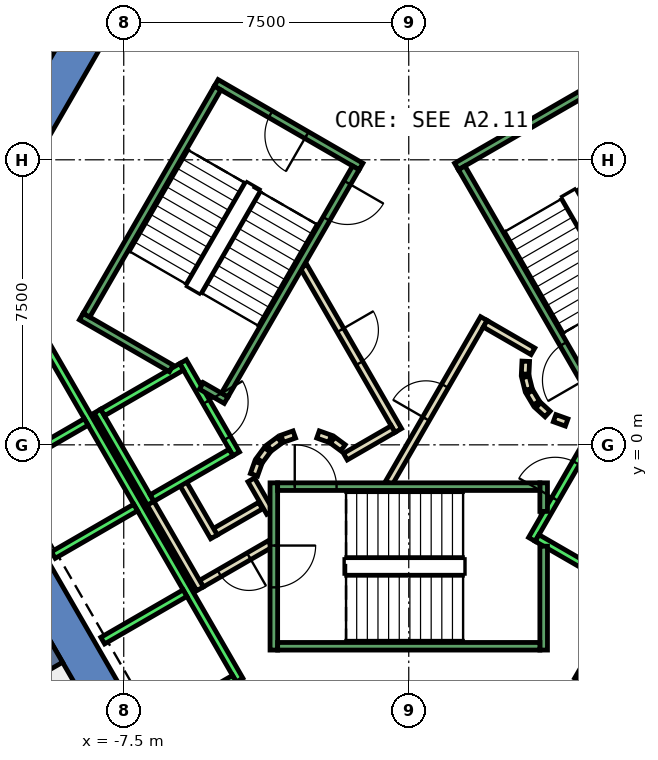
"""IFC4 building model, lengths in metres.
Left out: names, types, materials, properties, quantities, classifications, styles, units other than length and angle.
Written with IfcOpenShell. Run it as: python <this file> out.ifc"""

import sys

from ifc_helpers import new_model, si_unit, direction, frame, frame_2d, origin, place, context, subcontext, project, spatial, polyline, rectangle, outline, extrude, element, fill, save


model = new_model("IFC4")
c1 = context("Model", 3, precision=1e-05, world=origin(), true_north=direction((0.0, 1.0)))
c2 = subcontext(c1, "Body", "Model", "MODEL_VIEW")
j1 = project(units=[si_unit("LENGTHUNIT", "METRE"), si_unit("PLANEANGLEUNIT", "RADIAN")], contexts=[c1])
p1 = place(None, origin())
s1 = spatial("IfcSite", under=j1, at=p1, CompositionType="ELEMENT")
p2 = place(p1, origin())
s2 = spatial("IfcBuilding", under=s1, at=p2, CompositionType="ELEMENT")
p3 = place(p2, frame((0.0, 0.0, 43.4)))
s3 = spatial("IfcBuildingStorey", under=s2, at=p3, CompositionType="ELEMENT", Elevation=43.4)
p4 = place(p3, frame((0.0, 0.0, -0.4)))
e1 = element("IfcWall", 1, at=p4, inside=s3, PredefinedType="SHEAR", context=c2, shape_type="SweptSolid", body=[
    extrude(outline(polyline([(-12.267, 5.252), (-11.402, 4.752), (-6.351, 13.5), (-6.928, 14.5), (-12.267, 5.252)])), origin(), (0.0, 0.0, 1.0), 4.2),
])
p5 = place(p3, frame((0.0, 0.0, -0.4)))
e2 = element("IfcWall", 2, at=p5, inside=s3, PredefinedType="SHEAR", context=c2, shape_type="SweptSolid", body=[
    extrude(outline(polyline([(-13.856, 2.5), (-6.928, -9.5), (-6.351, -8.5), (-12.702, 2.5), (-13.856, 2.5)])), origin(), (0.0, 0.0, 1.0), 4.2),
])
p6 = place(p3, frame((-9.31, -5.375, -0.4), z_axis=(0.0, 0.0, 1.0), x_axis=(-0.866017533419, -0.500013631625, 0.0)))
e3 = element("IfcWall", 3, at=p6, inside=s3, PredefinedType="SHEAR", context=c2, shape_type="SweptSolid", body=[
    extrude(rectangle(XDim=9.0, YDim=0.8, at=frame_2d((4.5, 0.0))), origin(), (0.0, 0.0, 1.0), 4.2),
])
p7 = place(p3, frame((-3.9, -1.599, 0.0), z_axis=(0.0, 0.0, 1.0), x_axis=(-0.865969445389, -0.500096910261, 0.0)))
e4 = element("IfcWall", 4, at=p7, inside=s3, PredefinedType="PARTITIONING", context=c2, shape_type="SweptSolid", body=[
    extrude(rectangle(XDim=1.373, YDim=0.2, at=frame_2d((0.687, 0.0))), origin(), (0.0, 0.0, 1.0), 3.8),
])
p8 = place(p3, frame((-5.126, -2.422, 0.0), z_axis=(0.0, 0.0, 1.0), x_axis=(-0.500062241894, 0.865989465428, 0.0)))
e5 = element("IfcWall", 5, at=p8, inside=s3, PredefinedType="PARTITIONING", context=c2, shape_type="SweptSolid", body=[
    extrude(rectangle(XDim=1.7, YDim=0.2, at=frame_2d((0.85, 0.0))), origin(), (0.0, 0.0, 1.0), 3.8),
])
p9 = place(p3, frame((-3.65, -2.61, 0.0), z_axis=(0.0, 0.0, 1.0), x_axis=(-0.866072462134, -0.499918483688, 0.0)))
e6 = element("IfcWall", 6, at=p9, inside=s3, PredefinedType="PARTITIONING", context=c2, shape_type="SweptSolid", body=[
    extrude(rectangle(XDim=2.084, YDim=0.2, at=frame_2d((1.042, 0.0))), origin(), (0.0, 0.0, 1.0), 3.8),
])
p10 = place(p9, frame((0.642, 0.0, 0.0)))
e7 = element("IfcOpeningElement", 7, at=p10, cuts=e6, PredefinedType="OPENING", context=c2, shape_type="SweptSolid", body=[
    extrude(rectangle(XDim=0.9, YDim=2.1, at=frame_2d((0.45, 1.05))), frame((0.0, 0.11, 0.0), z_axis=(0.0, -1.0, 0.0), x_axis=(1.0, 0.0, 0.0)), (0.0, 0.0, 1.0), 0.22),
])
p11 = place(p3, frame((-5.492, -3.788, 0.0), z_axis=(0.0, 0.0, 1.0), x_axis=(-0.500008949224, 0.866020236886, 0.0)))
e8 = element("IfcWall", 8, at=p11, inside=s3, PredefinedType="PARTITIONING", context=c2, shape_type="SweptSolid", body=[
    extrude(rectangle(XDim=2.68, YDim=0.2, at=frame_2d((1.34, 0.0))), origin(), (0.0, 0.0, 1.0), 3.8),
])
p12 = place(p3, frame((-4.145, -0.92, 0.0), z_axis=(0.0, 0.0, 1.0), x_axis=(0.499743786207, -0.866173278362, 0.0)))
e9 = element("IfcWall", 9, at=p12, inside=s3, PredefinedType="PARTITIONING", context=c2, shape_type="SweptSolid", body=[
    extrude(rectangle(XDim=0.991, YDim=0.2, at=frame_2d((0.495, 0.0))), origin(), (0.0, 0.0, 1.0), 3.8),
])
p13 = place(p3, frame((-0.52, -1.0, 0.0), z_axis=(0.0, 0.0, 1.0), x_axis=(0.50011622646, 0.865958290007, 0.0)))
e10 = element("IfcWall", 10, at=p13, inside=s3, PredefinedType="PARTITIONING", context=c2, shape_type="SweptSolid", body=[
    extrude(rectangle(XDim=4.991, YDim=0.2, at=frame_2d((2.496, 0.0))), origin(), (0.0, 0.0, 1.0), 3.8),
])
p14 = place(p13, frame((1.945, 0.0, 0.0)))
e11 = element("IfcOpeningElement", 11, at=p14, cuts=e10, PredefinedType="OPENING", context=c2, shape_type="SweptSolid", body=[
    extrude(rectangle(XDim=1.0, YDim=2.1, at=frame_2d((0.5, 1.05))), frame((0.0, 0.11, 0.0), z_axis=(0.0, -1.0, 0.0), x_axis=(1.0, 0.0, 0.0)), (0.0, 0.0, 1.0), 0.22),
])
p15 = place(p3, frame((2.012, 3.186, 0.0), z_axis=(0.0, 0.0, 1.0), x_axis=(0.865891012941, -0.500232699559, 0.0)))
e12 = element("IfcWall", 12, at=p15, inside=s3, PredefinedType="PARTITIONING", context=c2, shape_type="SweptSolid", body=[
    extrude(rectangle(XDim=1.449, YDim=0.2, at=frame_2d((0.725, 0.0))), origin(), (0.0, 0.0, 1.0), 3.8),
])
p16 = place(p3, frame((3.079, 2.199, 0.0), z_axis=(0.0, 0.0, 1.0), x_axis=(-0.047771483479, -0.998858290933, 0.0)))
e13 = element("IfcWall", 13, at=p16, inside=s3, PredefinedType="PARTITIONING", context=c2, shape_type="SweptSolid", body=[
    extrude(rectangle(XDim=0.337, YDim=0.2, at=frame_2d((0.169, 0.0))), origin(), (0.0, 0.0, 1.0), 3.8),
])
p17 = place(p3, frame((3.07, 1.786, 0.0), z_axis=(0.0, 0.0, 1.0), x_axis=(0.242705583207, -0.970099994784, 0.0)))
e14 = element("IfcWall", 14, at=p17, inside=s3, PredefinedType="PARTITIONING", context=c2, shape_type="SweptSolid", body=[
    extrude(rectangle(XDim=0.338, YDim=0.2, at=frame_2d((0.169, 0.0))), origin(), (0.0, 0.0, 1.0), 3.8),
])
for number, where, z_axis, x_axis in (
    (15, (3.182, 1.388, 0.0), (0.0, 0.0, 1.0), (0.512, -0.859, 0.0)),
    (16, (3.404, 1.039, 0.0), (0.0, 0.0, 1.0), (0.74, -0.672, 0.0)),
):
    element("IfcWall", number, at=place(p3, frame(where, z_axis=z_axis, x_axis=x_axis)), inside=s3, PredefinedType="PARTITIONING", context=c2, shape_type="SweptSolid", body=[
        extrude(rectangle(XDim=0.338, YDim=0.2, at=frame_2d((0.169, 0.0))), origin(), (0.0, 0.0, 1.0), 3.8),
    ])
p18 = place(p3, frame((3.838, 0.702, 0.0), z_axis=(0.0, 0.0, 1.0), x_axis=(0.941035081519, -0.338308993895, 0.0)))
e17 = element("IfcWall", 17, at=p18, inside=s3, PredefinedType="PARTITIONING", context=c2, shape_type="SweptSolid", body=[
    extrude(rectangle(XDim=0.337, YDim=0.2, at=frame_2d((0.168, 0.0))), origin(), (0.0, 0.0, 1.0), 3.8),
])
p19 = place(p3, frame((-2.771, 4.7, 0.0), z_axis=(0.0, 0.0, 1.0), x_axis=(0.499969479948, -0.866043023828, 0.0)))
e18 = element("IfcWall", 18, at=p19, inside=s3, PredefinedType="PARTITIONING", context=c2, shape_type="SweptSolid", body=[
    extrude(rectangle(XDim=4.99, YDim=0.2, at=frame_2d((2.495, 0.0))), origin(), (0.0, 0.0, 1.0), 3.8),
])
p20 = place(p19, frame((1.945, 0.0, 0.0)))
e19 = element("IfcOpeningElement", 19, at=p20, cuts=e18, PredefinedType="OPENING", context=c2, shape_type="SweptSolid", body=[
    extrude(rectangle(XDim=1.0, YDim=2.1, at=frame_2d((0.5, 1.05))), frame((0.0, 0.11, 0.0), z_axis=(0.0, -1.0, 0.0), x_axis=(1.0, 0.0, 0.0)), (0.0, 0.0, 1.0), 0.22),
])
p21 = place(p3, frame((-0.412, 0.414, 0.0), z_axis=(0.0, 0.0, 1.0), x_axis=(-0.866017369001, -0.500013916395, 0.0)))
e20 = element("IfcWall", 20, at=p21, inside=s3, PredefinedType="PARTITIONING", context=c2, shape_type="SweptSolid", body=[
    extrude(rectangle(XDim=1.45, YDim=0.2, at=frame_2d((0.725, 0.0))), origin(), (0.0, 0.0, 1.0), 3.8),
])
p22 = place(p3, frame((-1.731, -0.077, 0.0), z_axis=(0.0, 0.0, 1.0), x_axis=(-0.804311165252, 0.594208338422, 0.0)))
e21 = element("IfcWall", 21, at=p22, inside=s3, PredefinedType="PARTITIONING", context=c2, shape_type="SweptSolid", body=[
    extrude(rectangle(XDim=0.338, YDim=0.2, at=frame_2d((0.169, 0.0))), origin(), (0.0, 0.0, 1.0), 3.8),
])
p23 = place(p3, frame((-2.07, 0.16, 0.0), z_axis=(0.0, 0.0, 1.0), x_axis=(-0.942199461132, 0.335052496547, 0.0)))
e22 = element("IfcWall", 22, at=p23, inside=s3, PredefinedType="PARTITIONING", context=c2, shape_type="SweptSolid", body=[
    extrude(rectangle(XDim=0.337, YDim=0.2, at=frame_2d((0.169, 0.0))), origin(), (0.0, 0.0, 1.0), 3.8),
])
p24 = place(p3, frame((-3.012, 0.273, 0.0), z_axis=(0.0, 0.0, 1.0), x_axis=(-0.942280615813, -0.334824194261, 0.0)))
e23 = element("IfcWall", 23, at=p24, inside=s3, PredefinedType="PARTITIONING", context=c2, shape_type="SweptSolid", body=[
    extrude(rectangle(XDim=0.338, YDim=0.2, at=frame_2d((0.169, 0.0))), origin(), (0.0, 0.0, 1.0), 3.8),
])
p25 = place(p3, frame((-3.397, 0.124, 0.0), z_axis=(0.0, 0.0, 1.0), x_axis=(-0.804311165252, -0.594208338422, 0.0)))
e24 = element("IfcWall", 24, at=p25, inside=s3, PredefinedType="PARTITIONING", context=c2, shape_type="SweptSolid", body=[
    extrude(rectangle(XDim=0.338, YDim=0.2, at=frame_2d((0.169, 0.0))), origin(), (0.0, 0.0, 1.0), 3.8),
])
p26 = place(p3, frame((-3.723, -0.131, 0.0), z_axis=(0.0, 0.0, 1.0), x_axis=(-0.594675113454, -0.803966112121, 0.0)))
e25 = element("IfcWall", 25, at=p26, inside=s3, PredefinedType="PARTITIONING", context=c2, shape_type="SweptSolid", body=[
    extrude(rectangle(XDim=0.338, YDim=0.2, at=frame_2d((0.169, 0.0))), origin(), (0.0, 0.0, 1.0), 3.8),
])
p27 = place(p3, frame((-3.96, -0.47, 0.0), z_axis=(0.0, 0.0, 1.0), x_axis=(-0.334824194261, -0.942280615813, 0.0)))
e26 = element("IfcWall", 26, at=p27, inside=s3, PredefinedType="PARTITIONING", context=c2, shape_type="SweptSolid", body=[
    extrude(rectangle(XDim=0.338, YDim=0.2, at=frame_2d((0.169, 0.0))), origin(), (0.0, 0.0, 1.0), 3.8),
])
p28 = place(p3, frame((-5.94, 2.188, 0.0), z_axis=(0.0, 0.0, 1.0), x_axis=(0.49994636267, -0.866056369097, 0.0)))
e27 = element("IfcWall", 27, at=p28, inside=s3, PredefinedType="STANDARD", context=c2, shape_type="SweptSolid", body=[
    extrude(rectangle(XDim=2.8, YDim=0.2, at=frame_2d((1.4, 0.0))), origin(), (0.0, 0.0, 1.0), 3.8),
])
p29 = place(p28, frame((1.225, 0.0, 0.0)))
e28 = element("IfcOpeningElement", 28, at=p29, cuts=e27, PredefinedType="OPENING", context=c2, shape_type="SweptSolid", body=[
    extrude(rectangle(XDim=1.1, YDim=2.1, at=frame_2d((0.55, 1.05))), frame((0.0, 0.11, 0.0), z_axis=(0.0, -1.0, 0.0), x_axis=(1.0, 0.0, 0.0)), (0.0, 0.0, 1.0), 0.22),
])
p30 = place(p3, frame((-8.192, 0.888, 0.0), z_axis=(0.0, 0.0, 1.0), x_axis=(0.49994636267, -0.866056369097, 0.0)))
e29 = element("IfcWall", 29, at=p30, inside=s3, PredefinedType="STANDARD", context=c2, shape_type="SweptSolid", body=[
    extrude(rectangle(XDim=2.8, YDim=0.2, at=frame_2d((1.4, 0.0))), origin(), (0.0, 0.0, 1.0), 3.8),
])
for number, where, z_axis, x_axis in (
    (30, (-5.977, 2.052, 0.0), (0.0, 0.0, 1.0), (-0.866, -0.5, 0.0)),
    (31, (-4.677, -0.2, 0.0), (0.0, 0.0, 1.0), (-0.866, -0.5, 0.0)),
):
    element("IfcWall", number, at=place(p3, frame(where, z_axis=z_axis, x_axis=x_axis)), inside=s3, PredefinedType="STANDARD", context=c2, shape_type="SweptSolid", body=[
        extrude(rectangle(XDim=2.399, YDim=0.2, at=frame_2d((1.2, 0.0))), origin(), (0.0, 0.0, 1.0), 3.8),
    ])
p31 = place(p3, frame((-9.751, 2.99, 0.0), z_axis=(0.0, 0.0, 1.0), x_axis=(0.50000090737, -0.866024879913, 0.0)))
e32 = element("IfcWall", 32, at=p31, inside=s3, PredefinedType="STANDARD", context=c2, shape_type="SweptSolid", body=[
    extrude(rectangle(XDim=10.6, YDim=0.2, at=frame_2d((5.3, 0.0))), origin(), (0.0, 0.0, 1.0), 3.8),
])
for number, where, z_axis, x_axis in (
    (33, (-8.488, 0.602, 0.0), (0.0, 0.0, 1.0), (-0.866, -0.5, 0.0)),
    (34, (-7.188, -1.65, 0.0), (0.0, 0.0, 1.0), (-0.866, -0.5, 0.0)),
    (35, (-5.888, -3.902, 0.0), (0.0, 0.0, 1.0), (-0.866, -0.5, 0.0)),
    (36, (-4.588, -6.153, 0.0), (0.0, 0.0, 1.0), (-0.866, -0.5, 0.0)),
):
    element("IfcWall", number, at=place(p3, frame(where, z_axis=z_axis, x_axis=x_axis)), inside=s3, PredefinedType="STANDARD", context=c2, shape_type="SweptSolid", body=[
        extrude(rectangle(XDim=2.5, YDim=0.2, at=frame_2d((1.25, 0.0))), origin(), (0.0, 0.0, 1.0), 3.8),
    ])
p32 = place(p3, frame((3.24, -2.488, 0.0), z_axis=(0.0, 0.0, 1.0), x_axis=(0.49994636267, 0.866056369097, 0.0)))
e37 = element("IfcWall", 37, at=p32, inside=s3, PredefinedType="STANDARD", context=c2, shape_type="SweptSolid", body=[
    extrude(rectangle(XDim=2.8, YDim=0.2, at=frame_2d((1.4, 0.0))), origin(), (0.0, 0.0, 1.0), 3.8),
])
p33 = place(p32, frame((1.225, 0.0, 0.0)))
e38 = element("IfcOpeningElement", 38, at=p33, cuts=e37, PredefinedType="OPENING", context=c2, shape_type="SweptSolid", body=[
    extrude(rectangle(XDim=1.1, YDim=2.1, at=frame_2d((0.55, 1.05))), frame((0.0, 0.11, 0.0), z_axis=(0.0, -1.0, 0.0), x_axis=(1.0, 0.0, 0.0)), (0.0, 0.0, 1.0), 0.22),
])
p34 = place(p3, frame((3.377, -2.452, 0.0), z_axis=(0.0, 0.0, 1.0), x_axis=(0.865955154139, -0.50012165622, 0.0)))
e39 = element("IfcWall", 39, at=p34, inside=s3, PredefinedType="STANDARD", context=c2, shape_type="SweptSolid", body=[
    extrude(rectangle(XDim=2.4, YDim=0.2, at=frame_2d((1.2, 0.0))), origin(), (0.0, 0.0, 1.0), 3.8),
])
p35 = place(p3, frame((4.451, -6.19, 0.0), z_axis=(0.0, 0.0, 1.0), x_axis=(0.50000090737, 0.866024879913, 0.0)))
e40 = element("IfcWall", 40, at=p35, inside=s3, PredefinedType="STANDARD", context=c2, shape_type="SweptSolid", body=[
    extrude(rectangle(XDim=10.6, YDim=0.2, at=frame_2d((5.3, 0.0))), origin(), (0.0, 0.0, 1.0), 3.8),
])
p36 = place(p3, frame((-3.55, -1.0, 0.0), z_axis=(0.0, 0.0, 1.0), x_axis=(0.0, -1.0, 0.0)))
e41 = element("IfcWall", 41, at=p36, inside=s3, PredefinedType="STANDARD", context=c2, shape_type="SweptSolid", body=[
    extrude(rectangle(XDim=4.4, YDim=0.2, at=frame_2d((2.2, 0.0))), origin(), (0.0, 0.0, 1.0), 3.8),
])
p37 = place(p36, frame((1.65, 0.0, 0.0)))
e42 = element("IfcOpeningElement", 42, at=p37, cuts=e41, PredefinedType="OPENING", context=c2, shape_type="SweptSolid", body=[
    extrude(rectangle(XDim=1.1, YDim=2.2, at=frame_2d((0.55, 1.1))), frame((0.0, 0.11, 0.0), z_axis=(0.0, -1.0, 0.0), x_axis=(1.0, 0.0, 0.0)), (0.0, 0.0, 1.0), 0.22),
])
p38 = place(p3, frame((3.55, -2.667, 0.0), z_axis=(0.0, 0.0, 1.0), x_axis=(0.0, -1.0, 0.0)))
e43 = element("IfcWall", 43, at=p38, inside=s3, PredefinedType="STANDARD", context=c2, shape_type="SweptSolid", body=[
    extrude(rectangle(XDim=2.733, YDim=0.2, at=frame_2d((1.366, 0.0))), origin(), (0.0, 0.0, 1.0), 3.8),
])
p39 = place(p3, frame((3.55, -1.0, 0.0), z_axis=(0.0, 0.0, 1.0), x_axis=(0.0, -1.0, 0.0)))
e44 = element("IfcWall", 44, at=p39, inside=s3, PredefinedType="STANDARD", context=c2, shape_type="SweptSolid", body=[
    extrude(rectangle(XDim=0.751, YDim=0.2, at=frame_2d((0.375, 0.0))), origin(), (0.0, 0.0, 1.0), 3.8),
])
p40 = place(p3, frame((-3.45, -1.1, 0.0), z_axis=(0.0, 0.0, 1.0), x_axis=(1.0, 0.0, 0.0)))
e45 = element("IfcWall", 45, at=p40, inside=s3, PredefinedType="STANDARD", context=c2, shape_type="SweptSolid", body=[
    extrude(rectangle(XDim=6.9, YDim=0.2, at=frame_2d((3.45, 0.0))), origin(), (0.0, 0.0, 1.0), 3.8),
])
p41 = place(p40, frame((0.45, 0.0, 0.0)))
e46 = element("IfcOpeningElement", 46, at=p41, cuts=e45, PredefinedType="OPENING", context=c2, shape_type="SweptSolid", body=[
    extrude(rectangle(XDim=1.1, YDim=2.2, at=frame_2d((0.55, 1.1))), frame((0.0, 0.11, 0.0), z_axis=(0.0, -1.0, 0.0), x_axis=(1.0, 0.0, 0.0)), (0.0, 0.0, 1.0), 0.22),
])
p42 = place(p3, frame((-3.45, -5.3, 0.0), z_axis=(0.0, 0.0, 1.0), x_axis=(1.0, 0.0, 0.0)))
e47 = element("IfcWall", 47, at=p42, inside=s3, PredefinedType="STANDARD", context=c2, shape_type="SweptSolid", body=[
    extrude(rectangle(XDim=6.9, YDim=0.2, at=frame_2d((3.45, 0.0))), origin(), (0.0, 0.0, 1.0), 3.8),
])
p43 = place(p3, frame((1.256, 7.324, 0.0), z_axis=(0.0, 0.0, 1.0), x_axis=(0.866046073146, 0.499964197906, 0.0)))
e48 = element("IfcWall", 48, at=p43, inside=s3, PredefinedType="STANDARD", context=c2, shape_type="SweptSolid", body=[
    extrude(rectangle(XDim=4.4, YDim=0.2, at=frame_2d((2.2, 0.0))), origin(), (0.0, 0.0, 1.0), 3.8),
])
p44 = place(p3, frame((4.843, 1.312, 0.0), z_axis=(0.0, 0.0, 1.0), x_axis=(-0.499963383562, 0.866046543262, 0.0)))
e49 = element("IfcWall", 49, at=p44, inside=s3, PredefinedType="STANDARD", context=c2, shape_type="SweptSolid", body=[
    extrude(rectangle(XDim=6.9, YDim=0.2, at=frame_2d((3.45, 0.0))), origin(), (0.0, 0.0, 1.0), 3.8),
])
p45 = place(p44, frame((0.45, 0.0, 0.0)))
e50 = element("IfcOpeningElement", 50, at=p45, cuts=e49, PredefinedType="OPENING", context=c2, shape_type="SweptSolid", body=[
    extrude(rectangle(XDim=1.1, YDim=2.2, at=frame_2d((0.55, 1.1))), frame((0.0, 0.11, 0.0), z_axis=(0.0, -1.0, 0.0), x_axis=(1.0, 0.0, 0.0)), (0.0, 0.0, 1.0), 0.22),
])
p46 = place(p3, frame((-1.256, 7.324, 0.0), z_axis=(0.0, 0.0, 1.0), x_axis=(-0.866046073146, 0.499964197906, 0.0)))
e51 = element("IfcWall", 51, at=p46, inside=s3, PredefinedType="STANDARD", context=c2, shape_type="SweptSolid", body=[
    extrude(rectangle(XDim=4.4, YDim=0.2, at=frame_2d((2.2, 0.0))), origin(), (0.0, 0.0, 1.0), 3.8),
])
p47 = place(p46, frame((1.65, 0.0, 0.0)))
e52 = element("IfcOpeningElement", 52, at=p47, cuts=e51, PredefinedType="OPENING", context=c2, shape_type="SweptSolid", body=[
    extrude(rectangle(XDim=1.1, YDim=2.2, at=frame_2d((0.55, 1.1))), frame((0.0, 0.11, 0.0), z_axis=(0.0, -1.0, 0.0), x_axis=(1.0, 0.0, 0.0)), (0.0, 0.0, 1.0), 0.22),
])
p48 = place(p3, frame((-6.25, 2.01, 0.0), z_axis=(0.0, 0.0, 1.0), x_axis=(-0.86611865017, 0.499838457731, 0.0)))
e53 = element("IfcWall", 53, at=p48, inside=s3, PredefinedType="STANDARD", context=c2, shape_type="SweptSolid", body=[
    extrude(rectangle(XDim=2.733, YDim=0.2, at=frame_2d((1.366, 0.0))), origin(), (0.0, 0.0, 1.0), 3.8),
])
p49 = place(p3, frame((-4.806, 1.176, 0.0), z_axis=(0.0, 0.0, 1.0), x_axis=(-0.866558586415, 0.499075361355, 0.0)))
e54 = element("IfcWall", 54, at=p49, inside=s3, PredefinedType="STANDARD", context=c2, shape_type="SweptSolid", body=[
    extrude(rectangle(XDim=0.751, YDim=0.2, at=frame_2d((0.376, 0.0))), origin(), (0.0, 0.0, 1.0), 3.8),
])
p50 = place(p3, frame((-1.393, 7.288, 0.0), z_axis=(0.0, 0.0, 1.0), x_axis=(-0.499963383562, -0.866046543262, 0.0)))
e55 = element("IfcWall", 55, at=p50, inside=s3, PredefinedType="STANDARD", context=c2, shape_type="SweptSolid", body=[
    extrude(rectangle(XDim=6.9, YDim=0.2, at=frame_2d((3.45, 0.0))), origin(), (0.0, 0.0, 1.0), 3.8),
])
p51 = place(p50, frame((0.45, 0.0, 0.0)))
e56 = element("IfcOpeningElement", 56, at=p51, cuts=e55, PredefinedType="OPENING", context=c2, shape_type="SweptSolid", body=[
    extrude(rectangle(XDim=1.1, YDim=2.2, at=frame_2d((0.55, 1.1))), frame((0.0, 0.11, 0.0), z_axis=(0.0, -1.0, 0.0), x_axis=(1.0, 0.0, 0.0)), (0.0, 0.0, 1.0), 0.22),
])
p52 = place(p3, frame((-5.03, 9.388, 0.0), z_axis=(0.0, 0.0, 1.0), x_axis=(-0.499978703459, -0.866037698999, 0.0)))
e57 = element("IfcWall", 57, at=p52, inside=s3, PredefinedType="STANDARD", context=c2, shape_type="SweptSolid", body=[
    extrude(rectangle(XDim=6.9, YDim=0.2, at=frame_2d((3.45, 0.0))), origin(), (0.0, 0.0, 1.0), 3.8),
])
p53 = place(p14, origin())
e58 = element("IfcDoor", 58, at=p53, inside=s3, OperationType="SINGLE_SWING_LEFT", PredefinedType="DOOR", context=c2, shape_type="SweptSolid", body=[
    extrude(rectangle(XDim=1.0, YDim=2.1, at=frame_2d((0.5, 1.05))), frame((0.0, 0.025, 0.0), z_axis=(0.0, -1.0, 0.0), x_axis=(1.0, 0.0, 0.0)), (0.0, 0.0, 1.0), 0.05),
])
fill(e11, e58)
p54 = place(p20, origin())
e59 = element("IfcDoor", 59, at=p54, inside=s3, OperationType="SINGLE_SWING_RIGHT", PredefinedType="DOOR", context=c2, shape_type="SweptSolid", body=[
    extrude(rectangle(XDim=1.0, YDim=2.1, at=frame_2d((0.5, 1.05))), frame((0.0, 0.025, 0.0), z_axis=(0.0, -1.0, 0.0), x_axis=(1.0, 0.0, 0.0)), (0.0, 0.0, 1.0), 0.05),
])
fill(e19, e59)
p55 = place(p10, origin())
e60 = element("IfcDoor", 60, at=p55, inside=s3, OperationType="SINGLE_SWING_LEFT", PredefinedType="DOOR", context=c2, shape_type="SweptSolid", body=[
    extrude(rectangle(XDim=0.9, YDim=2.1, at=frame_2d((0.45, 1.05))), frame((0.0, 0.025, 0.0), z_axis=(0.0, -1.0, 0.0), x_axis=(1.0, 0.0, 0.0)), (0.0, 0.0, 1.0), 0.05),
])
fill(e7, e60)
p56 = place(p33, origin())
e61 = element("IfcDoor", 61, at=p56, inside=s3, OperationType="SLIDING_TO_LEFT", PredefinedType="DOOR", context=c2, shape_type="SweptSolid", body=[
    extrude(rectangle(XDim=1.1, YDim=2.1, at=frame_2d((0.55, 1.05))), frame((0.0, 0.025, 0.0), z_axis=(0.0, -1.0, 0.0), x_axis=(1.0, 0.0, 0.0)), (0.0, 0.0, 1.0), 0.05),
])
fill(e38, e61)
p57 = place(p29, origin())
e62 = element("IfcDoor", 62, at=p57, inside=s3, OperationType="SLIDING_TO_LEFT", PredefinedType="DOOR", context=c2, shape_type="SweptSolid", body=[
    extrude(rectangle(XDim=1.1, YDim=2.1, at=frame_2d((0.55, 1.05))), frame((0.0, 0.025, 0.0), z_axis=(0.0, -1.0, 0.0), x_axis=(1.0, 0.0, 0.0)), (0.0, 0.0, 1.0), 0.05),
])
fill(e28, e62)
p58 = place(p41, origin())
e63 = element("IfcDoor", 63, at=p58, inside=s3, OperationType="SINGLE_SWING_LEFT", PredefinedType="DOOR", context=c2, shape_type="SweptSolid", body=[
    extrude(rectangle(XDim=1.1, YDim=2.2, at=frame_2d((0.55, 1.1))), frame((0.0, 0.025, 0.0), z_axis=(0.0, -1.0, 0.0), x_axis=(1.0, 0.0, 0.0)), (0.0, 0.0, 1.0), 0.05),
])
fill(e46, e63)
p59 = place(p37, origin())
e64 = element("IfcDoor", 64, at=p59, inside=s3, OperationType="SINGLE_SWING_LEFT", PredefinedType="DOOR", context=c2, shape_type="SweptSolid", body=[
    extrude(rectangle(XDim=1.1, YDim=2.2, at=frame_2d((0.55, 1.1))), frame((0.0, 0.025, 0.0), z_axis=(0.0, -1.0, 0.0), x_axis=(1.0, 0.0, 0.0)), (0.0, 0.0, 1.0), 0.05),
])
fill(e42, e64)
p60 = place(p45, origin())
e65 = element("IfcDoor", 65, at=p60, inside=s3, OperationType="SINGLE_SWING_LEFT", PredefinedType="DOOR", context=c2, shape_type="SweptSolid", body=[
    extrude(rectangle(XDim=1.1, YDim=2.2, at=frame_2d((0.55, 1.1))), frame((0.0, 0.025, 0.0), z_axis=(0.0, -1.0, 0.0), x_axis=(1.0, 0.0, 0.0)), (0.0, 0.0, 1.0), 0.05),
])
fill(e50, e65)
p61 = place(p51, origin())
e66 = element("IfcDoor", 66, at=p61, inside=s3, OperationType="SINGLE_SWING_LEFT", PredefinedType="DOOR", context=c2, shape_type="SweptSolid", body=[
    extrude(rectangle(XDim=1.1, YDim=2.2, at=frame_2d((0.55, 1.1))), frame((0.0, 0.025, 0.0), z_axis=(0.0, -1.0, 0.0), x_axis=(1.0, 0.0, 0.0)), (0.0, 0.0, 1.0), 0.05),
])
fill(e56, e66)
p62 = place(p47, origin())
e67 = element("IfcDoor", 67, at=p62, inside=s3, OperationType="SINGLE_SWING_LEFT", PredefinedType="DOOR", context=c2, shape_type="SweptSolid", body=[
    extrude(rectangle(XDim=1.1, YDim=2.2, at=frame_2d((0.55, 1.1))), frame((0.0, 0.025, 0.0), z_axis=(0.0, -1.0, 0.0), x_axis=(1.0, 0.0, 0.0)), (0.0, 0.0, 1.0), 0.05),
])
fill(e52, e67)
save(model, sys.argv[1])
